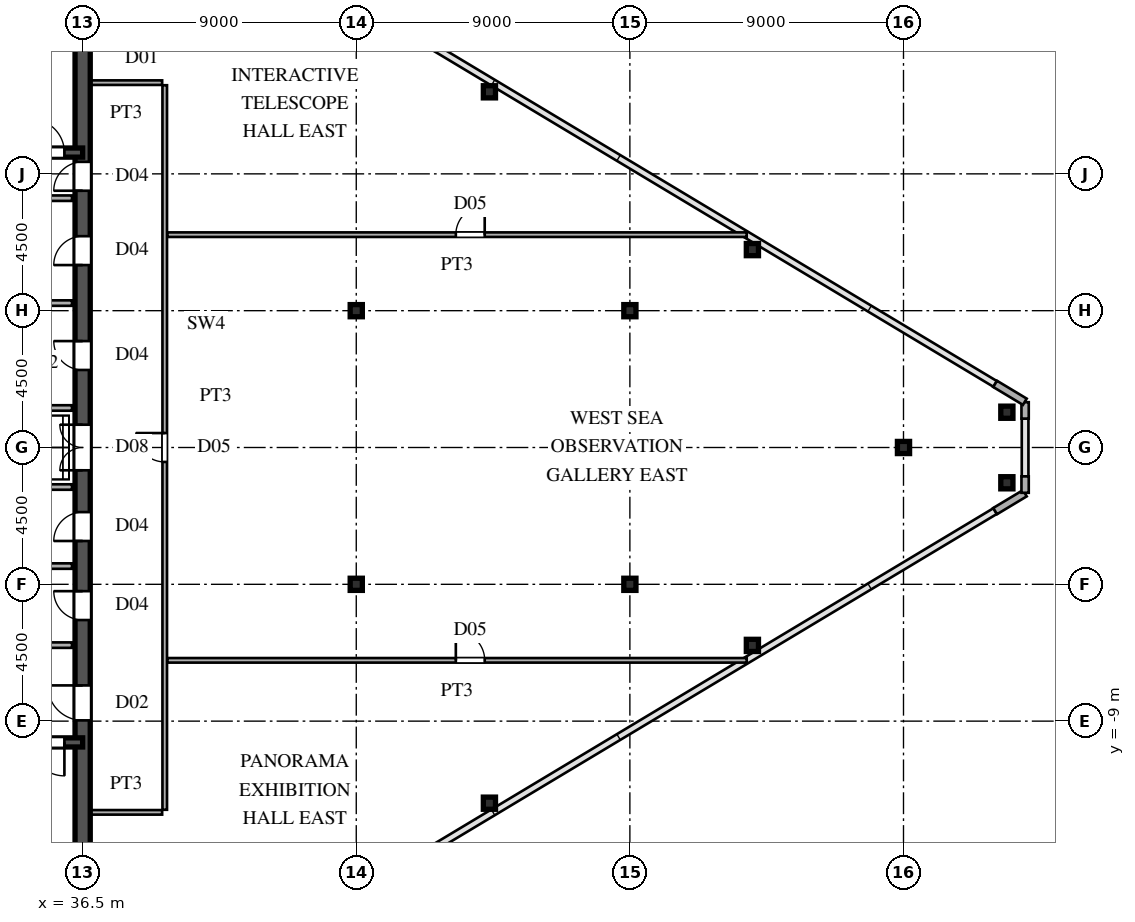
"""IFC4 building model, lengths in metres.
Left out: names, types, materials, properties, quantities, classifications, styles, units other than length and angle.
Written with IfcOpenShell. Run it as: python <this file> out.ifc"""

import sys

from ifc_helpers import new_model, si_unit, direction, frame, frame_2d, origin, origin_2d, place, context, subcontext, project, spatial, rectangle, hollow_rectangle, i_section, extrude, source, transform, mapped, element, fill, save


model = new_model("IFC4")
c1 = context("Model", 3, precision=1e-05, world=origin(), true_north=direction((0.0, 1.0)))
c2 = subcontext(c1, "Body", "Model", "MODEL_VIEW")
j1 = project(units=[si_unit("LENGTHUNIT", "METRE"), si_unit("PLANEANGLEUNIT", "RADIAN")], contexts=[c1])
p1 = place(None, origin())
s1 = spatial("IfcSite", under=j1, at=p1, CompositionType="ELEMENT")
p2 = place(p1, origin())
s2 = spatial("IfcBuilding", under=s1, at=p2, CompositionType="ELEMENT")
p3 = place(p2, frame((0.0, 0.0, 269.4)))
s3 = spatial("IfcBuildingStorey", under=s2, at=p3, CompositionType="ELEMENT", Elevation=269.4)
m1 = source(origin(), c2, "Body", "SweptSolid", [
    extrude(i_section(OverallWidth=0.4, OverallDepth=0.4, WebThickness=0.013, FlangeThickness=0.021, at=origin_2d()), origin(), (0.0, 0.0, 1.0), 4.8),
])
for number, where, z_axis, x_axis in (
    (1, (45.5, -4.5, 0.0), (0.0, 0.0, 1.0), (1.0, 0.0, 0.0)),
    (2, (45.5, 4.5, 0.0), (0.0, 0.0, 1.0), (1.0, 0.0, 0.0)),
    (3, (54.5, -4.5, 0.0), (0.0, 0.0, 1.0), (1.0, 0.0, 0.0)),
    (4, (54.5, 4.5, 0.0), (0.0, 0.0, 1.0), (1.0, 0.0, 0.0)),
    (5, (63.5, 0.0, 0.0), (0.0, 0.0, 1.0), (1.0, 0.0, 0.0)),
):
    element("IfcColumn", number, at=place(p3, frame(where, z_axis=z_axis, x_axis=x_axis)), inside=s3, PredefinedType="COLUMN", context=c2, shape_type="MappedRepresentation", body=[
        mapped(m1, transform((0.0, 0.0, 0.0), scale=1.0)),
    ])
m2 = source(origin(), c2, "Body", "SweptSolid", [
    extrude(hollow_rectangle(XDim=0.4, YDim=0.4, WallThickness=0.016, at=origin_2d()), origin(), (0.0, 0.0, 1.0), 4.8),
])
for number, where, z_axis, x_axis in (
    (6, (66.9, -1.16, 0.0), (0.0, 0.0, 1.0), (1.0, 0.0, 0.0)),
    (7, (66.9, 1.16, 0.0), (0.0, 0.0, 1.0), (1.0, 0.0, 0.0)),
    (8, (49.88, -11.699, 0.0), (0.0, 0.0, 1.0), (1.0, 0.0, 0.0)),
    (9, (58.53, -6.509, 0.0), (0.0, 0.0, 1.0), (1.0, 0.0, 0.0)),
    (10, (49.88, 11.699, 0.0), (0.0, 0.0, 1.0), (1.0, 0.0, 0.0)),
    (11, (58.53, 6.509, 0.0), (0.0, 0.0, 1.0), (1.0, 0.0, 0.0)),
):
    element("IfcColumn", number, at=place(p3, frame(where, z_axis=z_axis, x_axis=x_axis)), inside=s3, PredefinedType="COLUMN", context=c2, shape_type="MappedRepresentation", body=[
        mapped(m2, transform((0.0, 0.0, 0.0), scale=1.0)),
    ])
p4 = place(p3, frame((66.514, -2.092, 0.0), z_axis=(0.0, 0.0, 1.0), x_axis=(0.85743623509, 0.514590228002, 0.0)))
e12 = element("IfcWall", 12, at=p4, inside=s3, PredefinedType="SOLIDWALL", context=c2, shape_type="SweptSolid", body=[
    extrude(rectangle(XDim=1.14, YDim=0.24, at=frame_2d((0.57, 0.0))), origin(), (0.0, 0.0, 1.0), 4.54),
])
for number, where, z_axis, x_axis in (
    (13, (67.5, -1.49, 0.0), (0.0, 0.0, 1.0), (0.0, 1.0, 0.0)),
    (14, (67.5, 0.95, 0.0), (0.0, 0.0, 1.0), (0.0, 1.0, 0.0)),
):
    element("IfcWall", number, at=place(p3, frame(where, z_axis=z_axis, x_axis=x_axis)), inside=s3, PredefinedType="SOLIDWALL", context=c2, shape_type="SweptSolid", body=[
        extrude(rectangle(XDim=0.54, YDim=0.24, at=frame_2d((0.27, 0.0))), origin(), (0.0, 0.0, 1.0), 4.54),
    ])
p5 = place(p3, frame((67.491, 1.505, 0.0), z_axis=(0.0, 0.0, 1.0), x_axis=(-0.85743623509, 0.514590228002, 0.0)))
e15 = element("IfcWall", 15, at=p5, inside=s3, PredefinedType="SOLIDWALL", context=c2, shape_type="SweptSolid", body=[
    extrude(rectangle(XDim=1.14, YDim=0.24, at=frame_2d((0.57, 0.0))), origin(), (0.0, 0.0, 1.0), 4.54),
])
p6 = place(p3, frame((36.5, -13.65, 0.0), z_axis=(0.0, 0.0, 1.0), x_axis=(0.0, 1.0, 0.0)))
e16 = element("IfcWall", 16, at=p6, inside=s3, PredefinedType="SHEAR", context=c2, shape_type="SweptSolid", body=[
    extrude(rectangle(XDim=7.15, YDim=0.5, at=frame_2d((3.575, 0.0))), origin(), (0.0, 0.0, 1.0), 4.54),
])
p7 = place(p6, frame((4.675, 0.0, 0.0)))
e17 = element("IfcOpeningElement", 17, at=p7, cuts=e16, PredefinedType="OPENING", context=c2, shape_type="SweptSolid", body=[
    extrude(rectangle(XDim=1.15, YDim=2.2, at=frame_2d((0.575, 1.1))), frame((0.0, 0.26, 0.0), z_axis=(0.0, -1.0, 0.0), x_axis=(1.0, 0.0, 0.0)), (0.0, 0.0, 1.0), 0.52),
])
p8 = place(p3, frame((36.5, -1.3, 0.0), z_axis=(0.0, 0.0, 1.0), x_axis=(0.0, 1.0, 0.0)))
e18 = element("IfcWall", 18, at=p8, inside=s3, PredefinedType="SHEAR", context=c2, shape_type="SweptSolid", body=[
    extrude(rectangle(XDim=2.6, YDim=0.5, at=frame_2d((1.3, 0.0))), origin(), (0.0, 0.0, 1.0), 4.54),
])
p9 = place(p8, frame((0.55, 0.0, 0.0)))
e19 = element("IfcOpeningElement", 19, at=p9, cuts=e18, PredefinedType="OPENING", context=c2, shape_type="SweptSolid", body=[
    extrude(rectangle(XDim=1.5, YDim=2.3, at=frame_2d((0.75, 1.15))), frame((0.0, 0.26, 0.0), z_axis=(0.0, -1.0, 0.0), x_axis=(1.0, 0.0, 0.0)), (0.0, 0.0, 1.0), 0.52),
])
p10 = place(p3, frame((36.5, 8.2, 0.0), z_axis=(0.0, 0.0, 1.0), x_axis=(0.0, 1.0, 0.0)))
e20 = element("IfcWall", 20, at=p10, inside=s3, PredefinedType="SHEAR", context=c2, shape_type="SweptSolid", body=[
    extrude(rectangle(XDim=5.45, YDim=0.5, at=frame_2d((2.725, 0.0))), origin(), (0.0, 0.0, 1.0), 4.54),
])
p11 = place(p10, frame((0.245, 0.0, 0.0)))
e21 = element("IfcOpeningElement", 21, at=p11, cuts=e20, PredefinedType="OPENING", context=c2, shape_type="SweptSolid", body=[
    extrude(rectangle(XDim=0.95, YDim=2.15, at=frame_2d((0.475, 1.075))), frame((0.0, 0.26, 0.0), z_axis=(0.0, -1.0, 0.0), x_axis=(1.0, 0.0, 0.0)), (0.0, 0.0, 1.0), 0.52),
])
p12 = place(p3, frame((36.5, -6.5, 0.0), z_axis=(0.0, 0.0, 1.0), x_axis=(0.0, 1.0, 0.0)))
e22 = element("IfcWall", 22, at=p12, inside=s3, PredefinedType="SHEAR", context=c2, shape_type="SweptSolid", body=[
    extrude(rectangle(XDim=2.6, YDim=0.5, at=frame_2d((1.3, 0.0))), origin(), (0.0, 0.0, 1.0), 4.54),
])
p13 = place(p12, frame((0.825, 0.0, 0.0)))
e23 = element("IfcOpeningElement", 23, at=p13, cuts=e22, PredefinedType="OPENING", context=c2, shape_type="SweptSolid", body=[
    extrude(rectangle(XDim=0.95, YDim=2.15, at=frame_2d((0.475, 1.075))), frame((0.0, 0.26, 0.0), z_axis=(0.0, -1.0, 0.0), x_axis=(1.0, 0.0, 0.0)), (0.0, 0.0, 1.0), 0.52),
])
p14 = place(p3, frame((36.5, -3.9, 0.0), z_axis=(0.0, 0.0, 1.0), x_axis=(0.0, 1.0, 0.0)))
e24 = element("IfcWall", 24, at=p14, inside=s3, PredefinedType="SHEAR", context=c2, shape_type="SweptSolid", body=[
    extrude(rectangle(XDim=2.6, YDim=0.5, at=frame_2d((1.3, 0.0))), origin(), (0.0, 0.0, 1.0), 4.54),
])
p15 = place(p14, frame((0.825, 0.0, 0.0)))
e25 = element("IfcOpeningElement", 25, at=p15, cuts=e24, PredefinedType="OPENING", context=c2, shape_type="SweptSolid", body=[
    extrude(rectangle(XDim=0.95, YDim=2.15, at=frame_2d((0.475, 1.075))), frame((0.0, 0.26, 0.0), z_axis=(0.0, -1.0, 0.0), x_axis=(1.0, 0.0, 0.0)), (0.0, 0.0, 1.0), 0.52),
])
p16 = place(p3, frame((36.5, 1.3, 0.0), z_axis=(0.0, 0.0, 1.0), x_axis=(0.0, 1.0, 0.0)))
e26 = element("IfcWall", 26, at=p16, inside=s3, PredefinedType="SHEAR", context=c2, shape_type="SweptSolid", body=[
    extrude(rectangle(XDim=3.45, YDim=0.5, at=frame_2d((1.725, 0.0))), origin(), (0.0, 0.0, 1.0), 4.54),
])
p17 = place(p16, frame((1.25, 0.0, 0.0)))
e27 = element("IfcOpeningElement", 27, at=p17, cuts=e26, PredefinedType="OPENING", context=c2, shape_type="SweptSolid", body=[
    extrude(rectangle(XDim=0.95, YDim=2.15, at=frame_2d((0.475, 1.075))), frame((0.0, 0.26, 0.0), z_axis=(0.0, -1.0, 0.0), x_axis=(1.0, 0.0, 0.0)), (0.0, 0.0, 1.0), 0.52),
])
p18 = place(p3, frame((36.5, 4.75, 0.0), z_axis=(0.0, 0.0, 1.0), x_axis=(0.0, 1.0, 0.0)))
e28 = element("IfcWall", 28, at=p18, inside=s3, PredefinedType="SHEAR", context=c2, shape_type="SweptSolid", body=[
    extrude(rectangle(XDim=3.45, YDim=0.5, at=frame_2d((1.725, 0.0))), origin(), (0.0, 0.0, 1.0), 4.54),
])
p19 = place(p18, frame((1.25, 0.0, 0.0)))
e29 = element("IfcOpeningElement", 29, at=p19, cuts=e28, PredefinedType="OPENING", context=c2, shape_type="SweptSolid", body=[
    extrude(rectangle(XDim=0.95, YDim=2.15, at=frame_2d((0.475, 1.075))), frame((0.0, 0.26, 0.0), z_axis=(0.0, -1.0, 0.0), x_axis=(1.0, 0.0, 0.0)), (0.0, 0.0, 1.0), 0.52),
])
p20 = place(p3, frame((27.5, -9.7, 0.0), z_axis=(0.0, 0.0, 1.0), x_axis=(1.0, 0.0, 0.0)))
e30 = element("IfcWall", 30, at=p20, inside=s3, PredefinedType="SHEAR", context=c2, shape_type="SweptSolid", body=[
    extrude(rectangle(XDim=9.0, YDim=0.3, at=frame_2d((4.5, 0.0))), origin(), (0.0, 0.0, 1.0), 4.54),
])
p21 = place(p20, frame((7.3, 0.0, 0.0)))
e31 = element("IfcOpeningElement", 31, at=p21, cuts=e30, PredefinedType="OPENING", context=c2, shape_type="SweptSolid", body=[
    extrude(rectangle(XDim=1.1, YDim=2.2, at=frame_2d((0.55, 1.1))), frame((0.0, 0.16, 0.0), z_axis=(0.0, -1.0, 0.0), x_axis=(1.0, 0.0, 0.0)), (0.0, 0.0, 1.0), 0.32),
])
p22 = place(p3, frame((27.5, 9.7, 0.0), z_axis=(0.0, 0.0, 1.0), x_axis=(1.0, 0.0, 0.0)))
e32 = element("IfcWall", 32, at=p22, inside=s3, PredefinedType="SHEAR", context=c2, shape_type="SweptSolid", body=[
    extrude(rectangle(XDim=9.0, YDim=0.3, at=frame_2d((4.5, 0.0))), origin(), (0.0, 0.0, 1.0), 4.54),
])
p23 = place(p22, frame((7.3, 0.0, 0.0)))
e33 = element("IfcOpeningElement", 33, at=p23, cuts=e32, PredefinedType="OPENING", context=c2, shape_type="SweptSolid", body=[
    extrude(rectangle(XDim=1.1, YDim=2.2, at=frame_2d((0.55, 1.1))), frame((0.0, 0.16, 0.0), z_axis=(0.0, -1.0, 0.0), x_axis=(1.0, 0.0, 0.0)), (0.0, 0.0, 1.0), 0.32),
])
for number, where, z_axis, x_axis in (
    (34, (30.45, -6.5, 0.0), (0.0, 0.0, 1.0), (1.0, 0.0, 0.0)),
    (35, (30.45, 8.2, 0.0), (0.0, 0.0, 1.0), (1.0, 0.0, 0.0)),
):
    element("IfcWall", number, at=place(p3, frame(where, z_axis=z_axis, x_axis=x_axis)), inside=s3, PredefinedType="PARTITIONING", context=c2, shape_type="SweptSolid", body=[
        extrude(rectangle(XDim=5.7, YDim=0.18, at=frame_2d((2.85, 0.0))), origin(), (0.0, 0.0, 1.0), 4.54),
    ])
for number, where, z_axis, x_axis in (
    (36, (33.2, -1.3, 0.0), (0.0, 0.0, 1.0), (1.0, 0.0, 0.0)),
    (37, (33.2, 1.3, 0.0), (0.0, 0.0, 1.0), (1.0, 0.0, 0.0)),
    (38, (33.2, -3.9, 0.0), (0.0, 0.0, 1.0), (1.0, 0.0, 0.0)),
    (39, (33.2, 4.75, 0.0), (0.0, 0.0, 1.0), (1.0, 0.0, 0.0)),
):
    element("IfcWall", number, at=place(p3, frame(where, z_axis=z_axis, x_axis=x_axis)), inside=s3, PredefinedType="PARTITIONING", context=c2, shape_type="SweptSolid", body=[
        extrude(rectangle(XDim=2.95, YDim=0.18, at=frame_2d((1.475, 0.0))), origin(), (0.0, 0.0, 1.0), 4.54),
    ])
p24 = place(p3, frame((36.755, -12.0, 0.0), z_axis=(0.0, 0.0, 1.0), x_axis=(1.0, 0.0, 0.0)))
e40 = element("IfcWall", 40, at=p24, inside=s3, PredefinedType="PARTITIONING", context=c2, shape_type="SweptSolid", body=[
    extrude(rectangle(XDim=2.36, YDim=0.15, at=frame_2d((1.18, 0.0))), origin(), (0.0, 0.0, 1.0), 4.54),
])
p25 = place(p3, frame((39.285, -7.0, 0.0), z_axis=(0.0, 0.0, 1.0), x_axis=(1.0, 0.0, 0.0)))
e41 = element("IfcWall", 41, at=p25, inside=s3, PredefinedType="PARTITIONING", context=c2, shape_type="SweptSolid", body=[
    extrude(rectangle(XDim=19.058, YDim=0.15, at=frame_2d((9.529, 0.0))), origin(), (0.0, 0.0, 1.0), 4.54),
])
p26 = place(p25, frame((9.49, 0.0, 0.0)))
e42 = element("IfcOpeningElement", 42, at=p26, cuts=e41, PredefinedType="OPENING", context=c2, shape_type="SweptSolid", body=[
    extrude(rectangle(XDim=0.95, YDim=2.15, at=frame_2d((0.475, 1.075))), frame((0.0, 0.085, 0.0), z_axis=(0.0, -1.0, 0.0), x_axis=(1.0, 0.0, 0.0)), (0.0, 0.0, 1.0), 0.17),
])
p27 = place(p3, frame((39.285, 7.0, 0.0), z_axis=(0.0, 0.0, 1.0), x_axis=(1.0, 0.0, 0.0)))
e43 = element("IfcWall", 43, at=p27, inside=s3, PredefinedType="PARTITIONING", context=c2, shape_type="SweptSolid", body=[
    extrude(rectangle(XDim=19.058, YDim=0.15, at=frame_2d((9.529, 0.0))), origin(), (0.0, 0.0, 1.0), 4.54),
])
p28 = place(p27, frame((9.49, 0.0, 0.0)))
e44 = element("IfcOpeningElement", 44, at=p28, cuts=e43, PredefinedType="OPENING", context=c2, shape_type="SweptSolid", body=[
    extrude(rectangle(XDim=0.95, YDim=2.15, at=frame_2d((0.475, 1.075))), frame((0.0, 0.085, 0.0), z_axis=(0.0, -1.0, 0.0), x_axis=(1.0, 0.0, 0.0)), (0.0, 0.0, 1.0), 0.17),
])
p29 = place(p3, frame((36.755, 12.0, 0.0), z_axis=(0.0, 0.0, 1.0), x_axis=(1.0, 0.0, 0.0)))
e45 = element("IfcWall", 45, at=p29, inside=s3, PredefinedType="PARTITIONING", context=c2, shape_type="SweptSolid", body=[
    extrude(rectangle(XDim=2.36, YDim=0.15, at=frame_2d((1.18, 0.0))), origin(), (0.0, 0.0, 1.0), 4.54),
])
p30 = place(p3, frame((39.2, -11.915, 0.0), z_axis=(0.0, 0.0, 1.0), x_axis=(0.0, 1.0, 0.0)))
e46 = element("IfcWall", 46, at=p30, inside=s3, PredefinedType="PARTITIONING", context=c2, shape_type="SweptSolid", body=[
    extrude(rectangle(XDim=23.83, YDim=0.15, at=frame_2d((11.915, 0.0))), origin(), (0.0, 0.0, 1.0), 4.54),
])
p31 = place(p30, frame((11.44, 0.0, 0.0)))
e47 = element("IfcOpeningElement", 47, at=p31, cuts=e46, PredefinedType="OPENING", context=c2, shape_type="SweptSolid", body=[
    extrude(rectangle(XDim=0.95, YDim=2.15, at=frame_2d((0.475, 1.075))), frame((0.0, 0.085, 0.0), z_axis=(0.0, -1.0, 0.0), x_axis=(1.0, 0.0, 0.0)), (0.0, 0.0, 1.0), 0.17),
])
m3 = source(origin(), c2, "Body", "SweptSolid", [
    extrude(rectangle(XDim=1.15, YDim=2.2, at=frame_2d((0.575, 1.1))), frame((0.0, 0.025, 0.0), z_axis=(0.0, -1.0, 0.0), x_axis=(1.0, 0.0, 0.0)), (0.0, 0.0, 1.0), 0.05),
])
p32 = place(p7, origin())
e48 = element("IfcDoor", 48, at=p32, inside=s3, OperationType="SINGLE_SWING_RIGHT", PredefinedType="DOOR", context=c2, shape_type="MappedRepresentation", body=[
    mapped(m3, transform((0.0, 0.0, 0.0), scale=1.0)),
])
fill(e17, e48)
m4 = source(origin(), c2, "Body", "SweptSolid", [
    extrude(rectangle(XDim=1.5, YDim=2.3, at=frame_2d((0.75, 1.15))), frame((0.0, 0.025, 0.0), z_axis=(0.0, -1.0, 0.0), x_axis=(1.0, 0.0, 0.0)), (0.0, 0.0, 1.0), 0.05),
])
p33 = place(p9, origin())
e49 = element("IfcDoor", 49, at=p33, inside=s3, OperationType="DOUBLE_SWING_LEFT", PredefinedType="DOOR", context=c2, shape_type="MappedRepresentation", body=[
    mapped(m4, transform((0.0, 0.0, 0.0), scale=1.0)),
])
fill(e19, e49)
m5 = source(origin(), c2, "Body", "SweptSolid", [
    extrude(rectangle(XDim=0.95, YDim=2.15, at=frame_2d((0.475, 1.075))), frame((0.0, 0.025, 0.0), z_axis=(0.0, -1.0, 0.0), x_axis=(1.0, 0.0, 0.0)), (0.0, 0.0, 1.0), 0.05),
])
p34 = place(p11, origin())
e50 = element("IfcDoor", 50, at=p34, inside=s3, OperationType="SINGLE_SWING_LEFT", PredefinedType="DOOR", context=c2, shape_type="MappedRepresentation", body=[
    mapped(m5, transform((0.0, 0.0, 0.0), scale=1.0)),
])
fill(e21, e50)
p35 = place(p13, origin())
e51 = element("IfcDoor", 51, at=p35, inside=s3, OperationType="SINGLE_SWING_RIGHT", PredefinedType="DOOR", context=c2, shape_type="MappedRepresentation", body=[
    mapped(m5, transform((0.0, 0.0, 0.0), scale=1.0)),
])
fill(e23, e51)
p36 = place(p15, origin())
e52 = element("IfcDoor", 52, at=p36, inside=s3, OperationType="SINGLE_SWING_LEFT", PredefinedType="DOOR", context=c2, shape_type="MappedRepresentation", body=[
    mapped(m5, transform((0.0, 0.0, 0.0), scale=1.0)),
])
fill(e25, e52)
p37 = place(p17, origin())
e53 = element("IfcDoor", 53, at=p37, inside=s3, OperationType="SINGLE_SWING_RIGHT", PredefinedType="DOOR", context=c2, shape_type="MappedRepresentation", body=[
    mapped(m5, transform((0.0, 0.0, 0.0), scale=1.0)),
])
fill(e27, e53)
p38 = place(p19, origin())
e54 = element("IfcDoor", 54, at=p38, inside=s3, OperationType="SINGLE_SWING_LEFT", PredefinedType="DOOR", context=c2, shape_type="MappedRepresentation", body=[
    mapped(m5, transform((0.0, 0.0, 0.0), scale=1.0)),
])
fill(e29, e54)
m6 = source(origin(), c2, "Body", "SweptSolid", [
    extrude(rectangle(XDim=1.1, YDim=2.2, at=frame_2d((0.55, 1.1))), frame((0.0, 0.025, 0.0), z_axis=(0.0, -1.0, 0.0), x_axis=(1.0, 0.0, 0.0)), (0.0, 0.0, 1.0), 0.05),
])
p39 = place(p21, frame((1.1, 0.0, 0.0), z_axis=(0.0, 0.0, 1.0), x_axis=(-1.0, 0.0, 0.0)))
e55 = element("IfcDoor", 55, at=p39, inside=s3, OperationType="SINGLE_SWING_RIGHT", PredefinedType="DOOR", context=c2, shape_type="MappedRepresentation", body=[
    mapped(m6, transform((0.0, 0.0, 0.0), scale=1.0)),
])
fill(e31, e55)
p40 = place(p23, origin())
e56 = element("IfcDoor", 56, at=p40, inside=s3, OperationType="SINGLE_SWING_LEFT", PredefinedType="DOOR", context=c2, shape_type="MappedRepresentation", body=[
    mapped(m6, transform((0.0, 0.0, 0.0), scale=1.0)),
])
fill(e33, e56)
m7 = source(origin(), c2, "Body", "SweptSolid", [
    extrude(rectangle(XDim=0.95, YDim=2.15, at=frame_2d((0.475, 1.075))), frame((0.0, 0.025, 0.0), z_axis=(0.0, -1.0, 0.0), x_axis=(1.0, 0.0, 0.0)), (0.0, 0.0, 1.0), 0.05),
])
p41 = place(p26, origin())
e57 = element("IfcDoor", 57, at=p41, inside=s3, OperationType="SINGLE_SWING_LEFT", PredefinedType="DOOR", context=c2, shape_type="MappedRepresentation", body=[
    mapped(m7, transform((0.0, 0.0, 0.0), scale=1.0)),
])
fill(e42, e57)
p42 = place(p28, origin())
e58 = element("IfcDoor", 58, at=p42, inside=s3, OperationType="SINGLE_SWING_RIGHT", PredefinedType="DOOR", context=c2, shape_type="MappedRepresentation", body=[
    mapped(m7, transform((0.0, 0.0, 0.0), scale=1.0)),
])
fill(e44, e58)
p43 = place(p31, origin())
e59 = element("IfcDoor", 59, at=p43, inside=s3, OperationType="SINGLE_SWING_RIGHT", PredefinedType="DOOR", context=c2, shape_type="MappedRepresentation", body=[
    mapped(m7, transform((0.0, 0.0, 0.0), scale=1.0)),
])
fill(e47, e59)
save(model, sys.argv[1])
